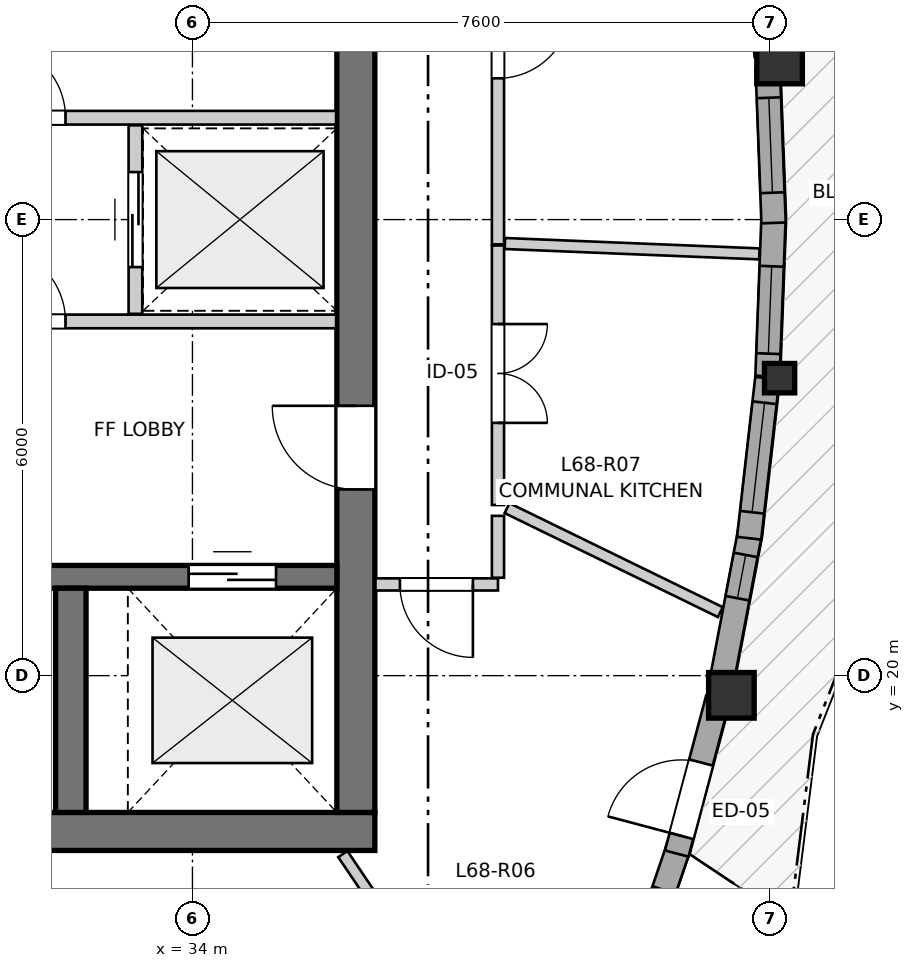
"""IFC4 building model, lengths in metres.
Left out: names, types, materials, properties, quantities, classifications, styles, units other than length and angle.
Written with IfcOpenShell. Run it as: python <this file> out.ifc"""

import sys

from ifc_helpers import new_model, si_unit, direction, frame, frame_2d, origin, origin_2d, place, context, subcontext, project, spatial, rectangle, i_section, extrude, source, transform, mapped, element, fill, save


model = new_model("IFC4")
c1 = context("Model", 3, precision=1e-05, world=origin(), true_north=direction((0.0, 1.0)))
c2 = subcontext(c1, "Body", "Model", "MODEL_VIEW")
j1 = project(units=[si_unit("LENGTHUNIT", "METRE"), si_unit("PLANEANGLEUNIT", "RADIAN")], contexts=[c1])
p1 = place(None, origin())
s1 = spatial("IfcSite", under=j1, at=p1, CompositionType="ELEMENT")
p2 = place(p1, origin())
s2 = spatial("IfcBuilding", under=s1, at=p2, CompositionType="ELEMENT")
p3 = place(p2, frame((0.0, 0.0, 227.6)))
s3 = spatial("IfcBuildingStorey", under=s2, at=p3, CompositionType="ELEMENT", Elevation=227.6)
p4 = place(p3, frame((24.3, 17.95, 0.0), z_axis=(0.0, 0.0, 1.0), x_axis=(1.0, 0.0, 0.0)))
e1 = element("IfcWall", 1, at=p4, inside=s3, PredefinedType="SHEAR", context=c2, shape_type="SweptSolid", body=[
    extrude(rectangle(XDim=12.1, YDim=0.5, at=frame_2d((6.05, 0.0))), origin(), (0.0, 0.0, 1.0), 2.96),
])
p5 = place(p3, frame((36.15, 18.2, 0.0), z_axis=(0.0, 0.0, 1.0), x_axis=(0.0, 1.0, 0.0)))
e2 = element("IfcWall", 2, at=p5, inside=s3, PredefinedType="SHEAR", context=c2, shape_type="SweptSolid", body=[
    extrude(rectangle(XDim=15.6, YDim=0.5, at=frame_2d((7.8, 0.0))), origin(), (0.0, 0.0, 1.0), 2.96),
])
p6 = place(p5, frame((4.25, 0.0, 0.0)))
e3 = element("IfcOpeningElement", 3, at=p6, cuts=e2, PredefinedType="OPENING", context=c2, shape_type="SweptSolid", body=[
    extrude(rectangle(XDim=1.1, YDim=2.15, at=frame_2d((0.55, 1.075))), frame((0.0, 0.26, 0.0), z_axis=(0.0, -1.0, 0.0), x_axis=(1.0, 0.0, 0.0)), (0.0, 0.0, 1.0), 0.52),
])
p7 = place(p5, frame((10.25, 0.0, 0.0)))
e4 = element("IfcOpeningElement", 4, at=p7, cuts=e2, PredefinedType="OPENING", context=c2, shape_type="SweptSolid", body=[
    extrude(rectangle(XDim=1.1, YDim=2.15, at=frame_2d((0.55, 1.075))), frame((0.0, 0.26, 0.0), z_axis=(0.0, -1.0, 0.0), x_axis=(1.0, 0.0, 0.0)), (0.0, 0.0, 1.0), 0.52),
])
p8 = place(p3, frame((24.8, 21.3, 0.0), z_axis=(0.0, 0.0, 1.0), x_axis=(1.0, 0.0, 0.0)))
e5 = element("IfcWall", 5, at=p8, inside=s3, PredefinedType="SHEAR", context=c2, shape_type="SweptSolid", body=[
    extrude(rectangle(XDim=11.1, YDim=0.3, at=frame_2d((5.55, 0.0))), origin(), (0.0, 0.0, 1.0), 2.96),
])
p9 = place(p8, frame((6.22, 0.0, 0.0)))
e6 = element("IfcOpeningElement", 6, at=p9, cuts=e5, PredefinedType="OPENING", context=c2, shape_type="SweptSolid", body=[
    extrude(rectangle(XDim=0.98, YDim=2.15, at=frame_2d((0.49, 1.075))), frame((0.0, 0.16, 0.0), z_axis=(0.0, -1.0, 0.0), x_axis=(1.0, 0.0, 0.0)), (0.0, 0.0, 1.0), 0.32),
])
p10 = place(p8, frame((9.15, 0.0, 0.0)))
e7 = element("IfcOpeningElement", 7, at=p10, cuts=e5, PredefinedType="OPENING", context=c2, shape_type="SweptSolid", body=[
    extrude(rectangle(XDim=1.15, YDim=2.15, at=frame_2d((0.575, 1.075))), frame((0.0, 0.16, 0.0), z_axis=(0.0, -1.0, 0.0), x_axis=(1.0, 0.0, 0.0)), (0.0, 0.0, 1.0), 0.32),
])
p11 = place(p3, frame((32.4, 18.2, 0.0), z_axis=(0.0, 0.0, 1.0), x_axis=(0.0, 1.0, 0.0)))
e8 = element("IfcWall", 8, at=p11, inside=s3, PredefinedType="SHEAR", context=c2, shape_type="SweptSolid", body=[
    extrude(rectangle(XDim=2.95, YDim=0.4, at=frame_2d((1.475, 0.0))), origin(), (0.0, 0.0, 1.0), 2.96),
])
m1 = source(origin(), c2, "Body", "SweptSolid", [
    extrude(rectangle(XDim=0.6, YDim=0.6, at=origin_2d()), origin(), (0.0, 0.0, 1.0), 2.96),
])
p12 = place(p3, frame((41.091, 19.741, 0.0), z_axis=(0.0, 0.0, 1.0), x_axis=(1.0, 0.0, 0.0)))
e9 = element("IfcColumn", 9, at=p12, inside=s3, PredefinedType="COLUMN", context=c2, shape_type="MappedRepresentation", body=[
    mapped(m1, transform((0.0, 0.0, 0.0), x_axis=(1.0, 0.0, 0.0), y_axis=(0.0, 1.0, 0.0), z_axis=(0.0, 0.0, 1.0), scale=1.0)),
])
m2 = source(origin(), c2, "Body", "SweptSolid", [
    extrude(i_section(OverallWidth=0.398, OverallDepth=0.387, WebThickness=0.019, FlangeThickness=0.03, FilletRadius=0.015, at=origin_2d()), origin(), (0.0, 0.0, 1.0), 2.96),
])
p13 = place(p3, frame((41.725, 23.914, 0.0), z_axis=(0.0, 0.0, 1.0), x_axis=(1.0, 0.0, 0.0)))
e10 = element("IfcColumn", 10, at=p13, inside=s3, PredefinedType="PILASTER", context=c2, shape_type="MappedRepresentation", body=[
    mapped(m2, transform((0.0, 0.0, 0.0), x_axis=(1.0, 0.0, 0.0), y_axis=(0.0, 1.0, 0.0), z_axis=(0.0, 0.0, 1.0), scale=1.0)),
])
p14 = place(p3, frame((41.725, 28.086, 0.0), z_axis=(0.0, 0.0, 1.0), x_axis=(1.0, 0.0, 0.0)))
e11 = element("IfcColumn", 11, at=p14, inside=s3, PredefinedType="COLUMN", context=c2, shape_type="MappedRepresentation", body=[
    mapped(m1, transform((0.0, 0.0, 0.0), x_axis=(1.0, 0.0, 0.0), y_axis=(0.0, 1.0, 0.0), z_axis=(0.0, 0.0, 1.0), scale=1.0)),
])
p15 = place(p3, frame((39.677, 15.639, 0.0), z_axis=(0.0, 0.0, 1.0), x_axis=(0.323664392341, 0.946171951143, 0.0)))
e12 = element("IfcWall", 12, at=p15, inside=s3, PredefinedType="SOLIDWALL", context=c2, shape_type="SweptSolid", body=[
    extrude(rectangle(XDim=2.223, YDim=0.32, at=frame_2d((1.111, 0.0))), origin(), (0.0, 0.0, 1.0), 2.58),
])
p16 = place(p15, frame((0.576, 0.0, 0.82)))
e13 = element("IfcOpeningElement", 13, at=p16, cuts=e12, PredefinedType="OPENING", context=c2, shape_type="SweptSolid", body=[
    extrude(rectangle(XDim=1.05, YDim=1.45, at=frame_2d((0.525, 0.725))), frame((0.0, 0.17, 0.0), z_axis=(0.0, -1.0, 0.0), x_axis=(1.0, 0.0, 0.0)), (0.0, 0.0, 1.0), 0.34),
])
p17 = place(p3, frame((40.372, 17.659, 0.0), z_axis=(0.0, 0.0, 1.0), x_axis=(0.2570422776, 0.966400159109, 0.0)))
e14 = element("IfcWall", 14, at=p17, inside=s3, PredefinedType="SOLIDWALL", context=c2, shape_type="SweptSolid", body=[
    extrude(rectangle(XDim=2.107, YDim=0.32, at=frame_2d((1.053, 0.0))), origin(), (0.0, 0.0, 1.0), 2.58),
])
p18 = place(p17, frame((0.24, 0.0, 0.0)))
e15 = element("IfcOpeningElement", 15, at=p18, cuts=e14, PredefinedType="OPENING", context=c2, shape_type="SweptSolid", body=[
    extrude(rectangle(XDim=1.0, YDim=2.1, at=frame_2d((0.5, 1.05))), frame((0.0, 0.17, 0.0), z_axis=(0.0, -1.0, 0.0), x_axis=(1.0, 0.0, 0.0)), (0.0, 0.0, 1.0), 0.34),
])
p19 = place(p3, frame((40.95, 19.86, 0.0), z_axis=(0.0, 0.0, 1.0), x_axis=(0.18667884524, 0.982420993638, 0.0)))
e16 = element("IfcWall", 16, at=p19, inside=s3, PredefinedType="SOLIDWALL", context=c2, shape_type="SweptSolid", body=[
    extrude(rectangle(XDim=2.072, YDim=0.32, at=frame_2d((1.036, 0.0))), origin(), (0.0, 0.0, 1.0), 2.58),
])
p20 = place(p19, frame((1.18, 0.0, 0.82)))
e17 = element("IfcOpeningElement", 17, at=p20, cuts=e16, PredefinedType="OPENING", context=c2, shape_type="SweptSolid", body=[
    extrude(rectangle(XDim=0.58, YDim=1.35, at=frame_2d((0.29, 0.675))), frame((0.0, 0.17, 0.0), z_axis=(0.0, -1.0, 0.0), x_axis=(1.0, 0.0, 0.0)), (0.0, 0.0, 1.0), 0.34),
])
p21 = place(p3, frame((41.324, 21.808, 0.0), z_axis=(0.0, 0.0, 1.0), x_axis=(0.113315758547, 0.993559026362, 0.0)))
e18 = element("IfcWall", 18, at=p21, inside=s3, PredefinedType="SOLIDWALL", context=c2, shape_type="SweptSolid", body=[
    extrude(rectangle(XDim=2.118, YDim=0.32, at=frame_2d((1.059, 0.0))), origin(), (0.0, 0.0, 1.0), 2.58),
])
p22 = place(p21, frame((0.344, 0.0, 0.82)))
e19 = element("IfcOpeningElement", 19, at=p22, cuts=e18, PredefinedType="OPENING", context=c2, shape_type="SweptSolid", body=[
    extrude(rectangle(XDim=1.45, YDim=1.25, at=frame_2d((0.725, 0.625))), frame((0.0, 0.17, 0.0), z_axis=(0.0, -1.0, 0.0), x_axis=(1.0, 0.0, 0.0)), (0.0, 0.0, 1.0), 0.34),
])
p23 = place(p3, frame((41.566, 23.94, 0.0), z_axis=(0.0, 0.0, 1.0), x_axis=(0.037912160544, 0.999281075615, 0.0)))
e20 = element("IfcWall", 20, at=p23, inside=s3, PredefinedType="SOLIDWALL", context=c2, shape_type="SweptSolid", body=[
    extrude(rectangle(XDim=2.106, YDim=0.32, at=frame_2d((1.053, 0.0))), origin(), (0.0, 0.0, 1.0), 2.58),
])
p24 = place(p23, frame((0.297, 0.0, 0.82)))
e21 = element("IfcOpeningElement", 21, at=p24, cuts=e20, PredefinedType="OPENING", context=c2, shape_type="SweptSolid", body=[
    extrude(rectangle(XDim=1.15, YDim=1.2, at=frame_2d((0.575, 0.6))), frame((0.0, 0.17, 0.0), z_axis=(0.0, -1.0, 0.0), x_axis=(1.0, 0.0, 0.0)), (0.0, 0.0, 1.0), 0.34),
])
p25 = place(p3, frame((41.646, 25.956, 0.0), z_axis=(0.0, 0.0, 1.0), x_axis=(-0.038018581285, 0.999277032397, 0.0)))
e22 = element("IfcWall", 22, at=p25, inside=s3, PredefinedType="SOLIDWALL", context=c2, shape_type="SweptSolid", body=[
    extrude(rectangle(XDim=2.036, YDim=0.32, at=frame_2d((1.018, 0.0))), origin(), (0.0, 0.0, 1.0), 2.58),
])
p26 = place(p25, frame((0.398, 0.0, 0.82)))
e23 = element("IfcOpeningElement", 23, at=p26, cuts=e22, PredefinedType="OPENING", context=c2, shape_type="SweptSolid", body=[
    extrude(rectangle(XDim=1.25, YDim=1.35, at=frame_2d((0.625, 0.675))), frame((0.0, 0.17, 0.0), z_axis=(0.0, -1.0, 0.0), x_axis=(1.0, 0.0, 0.0)), (0.0, 0.0, 1.0), 0.34),
])
p27 = place(p3, frame((41.556, 28.158, 0.0), z_axis=(0.0, 0.0, 1.0), x_axis=(-0.113270843693, 0.993564147888, 0.0)))
e24 = element("IfcWall", 24, at=p27, inside=s3, PredefinedType="SOLIDWALL", context=c2, shape_type="SweptSolid", body=[
    extrude(rectangle(XDim=2.048, YDim=0.32, at=frame_2d((1.024, 0.0))), origin(), (0.0, 0.0, 1.0), 2.58),
])
p28 = place(p27, frame((0.544, 0.0, 0.82)))
e25 = element("IfcOpeningElement", 25, at=p28, cuts=e24, PredefinedType="OPENING", context=c2, shape_type="SweptSolid", body=[
    extrude(rectangle(XDim=0.95, YDim=1.35, at=frame_2d((0.475, 0.675))), frame((0.0, 0.17, 0.0), z_axis=(0.0, -1.0, 0.0), x_axis=(1.0, 0.0, 0.0)), (0.0, 0.0, 1.0), 0.34),
])
p29 = place(p3, frame((30.67, 24.66, 0.0), z_axis=(0.0, 0.0, 1.0), x_axis=(1.0, 0.0, 0.0)))
e26 = element("IfcWall", 26, at=p29, inside=s3, PredefinedType="PARTITIONING", context=c2, shape_type="SweptSolid", body=[
    extrude(rectangle(XDim=5.22, YDim=0.18, at=frame_2d((2.61, 0.0))), origin(), (0.0, 0.0, 1.0), 2.96),
])
p30 = place(p29, frame((0.68, 0.0, 0.0)))
e27 = element("IfcOpeningElement", 27, at=p30, cuts=e26, PredefinedType="OPENING", context=c2, shape_type="SweptSolid", body=[
    extrude(rectangle(XDim=0.98, YDim=2.15, at=frame_2d((0.49, 1.075))), frame((0.0, 0.1, 0.0), z_axis=(0.0, -1.0, 0.0), x_axis=(1.0, 0.0, 0.0)), (0.0, 0.0, 1.0), 0.2),
])
p31 = place(p3, frame((30.67, 27.34, 0.0), z_axis=(0.0, 0.0, 1.0), x_axis=(1.0, 0.0, 0.0)))
e28 = element("IfcWall", 28, at=p31, inside=s3, PredefinedType="PARTITIONING", context=c2, shape_type="SweptSolid", body=[
    extrude(rectangle(XDim=5.22, YDim=0.18, at=frame_2d((2.61, 0.0))), origin(), (0.0, 0.0, 1.0), 2.96),
])
p32 = place(p31, frame((0.68, 0.0, 0.0)))
e29 = element("IfcOpeningElement", 29, at=p32, cuts=e28, PredefinedType="OPENING", context=c2, shape_type="SweptSolid", body=[
    extrude(rectangle(XDim=0.98, YDim=2.15, at=frame_2d((0.49, 1.075))), frame((0.0, 0.1, 0.0), z_axis=(0.0, -1.0, 0.0), x_axis=(1.0, 0.0, 0.0)), (0.0, 0.0, 1.0), 0.2),
])
p33 = place(p3, frame((33.25, 24.76, 0.0), z_axis=(0.0, 0.0, 1.0), x_axis=(0.0, 1.0, 0.0)))
e30 = element("IfcWall", 30, at=p33, inside=s3, PredefinedType="PARTITIONING", context=c2, shape_type="SweptSolid", body=[
    extrude(rectangle(XDim=2.48, YDim=0.18, at=frame_2d((1.24, 0.0))), origin(), (0.0, 0.0, 1.0), 2.96),
])
p34 = place(p33, frame((0.615, 0.0, 0.0)))
e31 = element("IfcOpeningElement", 31, at=p34, cuts=e30, PredefinedType="OPENING", context=c2, shape_type="SweptSolid", body=[
    extrude(rectangle(XDim=1.25, YDim=2.15, at=frame_2d((0.625, 1.075))), frame((0.0, 0.1, 0.0), z_axis=(0.0, -1.0, 0.0), x_axis=(1.0, 0.0, 0.0)), (0.0, 0.0, 1.0), 0.2),
])
p35 = place(p3, frame((38.02, 31.006, 0.0), z_axis=(0.0, 0.0, 1.0), x_axis=(0.0, -1.0, 0.0)))
e32 = element("IfcWall", 32, at=p35, inside=s3, PredefinedType="PARTITIONING", context=c2, shape_type="SweptSolid", body=[
    extrude(rectangle(XDim=5.332, YDim=0.16, at=frame_2d((2.666, 0.0))), origin(), (0.0, 0.0, 1.0), 2.628),
])
p36 = place(p35, frame((2.188, 0.0, 0.0)))
e33 = element("IfcOpeningElement", 33, at=p36, cuts=e32, PredefinedType="OPENING", context=c2, shape_type="SweptSolid", body=[
    extrude(rectangle(XDim=0.96, YDim=2.1, at=frame_2d((0.48, 1.05))), frame((0.0, 0.09, 0.0), z_axis=(0.0, -1.0, 0.0), x_axis=(1.0, 0.0, 0.0)), (0.0, 0.0, 1.0), 0.18),
])
p37 = place(p3, frame((38.02, 25.659, 0.0), z_axis=(0.0, 0.0, 1.0), x_axis=(0.0, -1.0, 0.0)))
e34 = element("IfcWall", 34, at=p37, inside=s3, PredefinedType="PARTITIONING", context=c2, shape_type="SweptSolid", body=[
    extrude(rectangle(XDim=3.414, YDim=0.16, at=frame_2d((1.707, 0.0))), origin(), (0.0, 0.0, 1.0), 2.628),
])
p38 = place(p37, frame((1.033, 0.0, 0.0)))
e35 = element("IfcOpeningElement", 35, at=p38, cuts=e34, PredefinedType="OPENING", context=c2, shape_type="SweptSolid", body=[
    extrude(rectangle(XDim=1.3, YDim=2.1, at=frame_2d((0.65, 1.05))), frame((0.0, 0.09, 0.0), z_axis=(0.0, -1.0, 0.0), x_axis=(1.0, 0.0, 0.0)), (0.0, 0.0, 1.0), 0.18),
])
p39 = place(p3, frame((38.02, 21.2, 0.0), z_axis=(0.0, 0.0, 1.0), x_axis=(-1.0, 0.0, 0.0)))
e36 = element("IfcWall", 36, at=p39, inside=s3, PredefinedType="PARTITIONING", context=c2, shape_type="SweptSolid", body=[
    extrude(rectangle(XDim=1.612, YDim=0.16, at=frame_2d((0.806, 0.0))), origin(), (0.0, 0.0, 1.0), 2.96),
])
p40 = place(p39, frame((0.33, 0.0, 0.0)))
e37 = element("IfcOpeningElement", 37, at=p40, cuts=e36, PredefinedType="OPENING", context=c2, shape_type="SweptSolid", body=[
    extrude(rectangle(XDim=0.96, YDim=2.1, at=frame_2d((0.48, 1.05))), frame((0.0, 0.09, 0.0), z_axis=(0.0, -1.0, 0.0), x_axis=(1.0, 0.0, 0.0)), (0.0, 0.0, 1.0), 0.18),
])
p41 = place(p3, frame((35.979, 17.653, 0.0), z_axis=(0.0, 0.0, 1.0), x_axis=(0.559125350393, -0.829083133677, 0.0)))
e38 = element("IfcWall", 38, at=p41, inside=s3, PredefinedType="PARTITIONING", context=c2, shape_type="SweptSolid", body=[
    extrude(rectangle(XDim=5.262, YDim=0.145, at=frame_2d((2.631, 0.0))), origin(), (0.0, 0.0, 1.0), 2.96),
])
p42 = place(p3, frame((38.111, 25.685, 0.0), z_axis=(0.0, 0.0, 1.0), x_axis=(0.999167325882, -0.040800182477, 0.0)))
e39 = element("IfcWall", 39, at=p42, inside=s3, PredefinedType="PARTITIONING", context=c2, shape_type="SweptSolid", body=[
    extrude(rectangle(XDim=3.351, YDim=0.145, at=frame_2d((1.675, 0.0))), origin(), (0.0, 0.0, 1.0), 2.96),
])
p43 = place(p3, frame((38.139, 22.204, 0.0), z_axis=(0.0, 0.0, 1.0), x_axis=(0.898869860356, -0.43821567081, 0.0)))
e40 = element("IfcWall", 40, at=p43, inside=s3, PredefinedType="PARTITIONING", context=c2, shape_type="SweptSolid", body=[
    extrude(rectangle(XDim=3.123, YDim=0.145, at=frame_2d((1.562, 0.0))), origin(), (0.0, 0.0, 1.0), 2.96),
])
p44 = place(p3, frame((38.02, 21.288, 0.0), z_axis=(0.0, 0.0, 1.0), x_axis=(0.0, 1.0, 0.0)))
e41 = element("IfcWall", 41, at=p44, inside=s3, PredefinedType="PARTITIONING", context=c2, shape_type="SweptSolid", body=[
    extrude(rectangle(XDim=0.814, YDim=0.16, at=frame_2d((0.407, 0.0))), origin(), (0.0, 0.0, 1.0), 2.628),
])
m3 = source(origin(), c2, "Body", "SweptSolid", [
    extrude(rectangle(XDim=0.58, YDim=1.35, at=frame_2d((0.29, 0.675))), frame((0.0, 0.03, 0.0), z_axis=(0.0, -1.0, 0.0), x_axis=(1.0, 0.0, 0.0)), (0.0, 0.0, 1.0), 0.06),
])
p45 = place(p20, origin())
e42 = element("IfcWindow", 42, at=p45, inside=s3, PartitioningType="SINGLE_PANEL", PredefinedType="WINDOW", context=c2, shape_type="MappedRepresentation", body=[
    mapped(m3, transform((0.0, 0.0, 0.0), x_axis=(1.0, 0.0, 0.0), y_axis=(0.0, 1.0, 0.0), z_axis=(0.0, 0.0, 1.0), scale=1.0)),
])
fill(e17, e42)
m4 = source(origin(), c2, "Body", "SweptSolid", [
    extrude(rectangle(XDim=1.45, YDim=1.25, at=frame_2d((0.725, 0.625))), frame((0.0, 0.03, 0.0), z_axis=(0.0, -1.0, 0.0), x_axis=(1.0, 0.0, 0.0)), (0.0, 0.0, 1.0), 0.06),
])
p46 = place(p22, origin())
e43 = element("IfcWindow", 43, at=p46, inside=s3, PartitioningType="SINGLE_PANEL", PredefinedType="WINDOW", context=c2, shape_type="MappedRepresentation", body=[
    mapped(m4, transform((0.0, 0.0, 0.0), x_axis=(1.0, 0.0, 0.0), y_axis=(0.0, 1.0, 0.0), z_axis=(0.0, 0.0, 1.0), scale=1.0)),
])
fill(e19, e43)
m5 = source(origin(), c2, "Body", "SweptSolid", [
    extrude(rectangle(XDim=1.15, YDim=1.2, at=frame_2d((0.575, 0.6))), frame((0.0, 0.03, 0.0), z_axis=(0.0, -1.0, 0.0), x_axis=(1.0, 0.0, 0.0)), (0.0, 0.0, 1.0), 0.06),
])
p47 = place(p24, origin())
e44 = element("IfcWindow", 44, at=p47, inside=s3, PartitioningType="SINGLE_PANEL", PredefinedType="WINDOW", context=c2, shape_type="MappedRepresentation", body=[
    mapped(m5, transform((0.0, 0.0, 0.0), x_axis=(1.0, 0.0, 0.0), y_axis=(0.0, 1.0, 0.0), z_axis=(0.0, 0.0, 1.0), scale=1.0)),
])
fill(e21, e44)
m6 = source(origin(), c2, "Body", "SweptSolid", [
    extrude(rectangle(XDim=1.25, YDim=1.35, at=frame_2d((0.625, 0.675))), frame((0.0, 0.03, 0.0), z_axis=(0.0, -1.0, 0.0), x_axis=(1.0, 0.0, 0.0)), (0.0, 0.0, 1.0), 0.06),
])
p48 = place(p26, origin())
e45 = element("IfcWindow", 45, at=p48, inside=s3, PartitioningType="SINGLE_PANEL", PredefinedType="WINDOW", context=c2, shape_type="MappedRepresentation", body=[
    mapped(m6, transform((0.0, 0.0, 0.0), x_axis=(1.0, 0.0, 0.0), y_axis=(0.0, 1.0, 0.0), z_axis=(0.0, 0.0, 1.0), scale=1.0)),
])
fill(e23, e45)
m7 = source(origin(), c2, "Body", "SweptSolid", [
    extrude(rectangle(XDim=1.0, YDim=2.1, at=frame_2d((0.5, 1.05))), frame((0.0, 0.025, 0.0), z_axis=(0.0, -1.0, 0.0), x_axis=(1.0, 0.0, 0.0)), (0.0, 0.0, 1.0), 0.05),
])
p49 = place(p18, origin())
e46 = element("IfcDoor", 46, at=p49, inside=s3, OperationType="SINGLE_SWING_LEFT", PredefinedType="DOOR", context=c2, shape_type="MappedRepresentation", body=[
    mapped(m7, transform((0.0, 0.0, 0.0), x_axis=(1.0, 0.0, 0.0), y_axis=(0.0, 1.0, 0.0), z_axis=(0.0, 0.0, 1.0), scale=1.0)),
])
fill(e15, e46)
m8 = source(origin(), c2, "Body", "SweptSolid", [
    extrude(rectangle(XDim=1.15, YDim=2.15, at=frame_2d((0.575, 1.075))), frame((0.0, 0.025, 0.0), z_axis=(0.0, -1.0, 0.0), x_axis=(1.0, 0.0, 0.0)), (0.0, 0.0, 1.0), 0.05),
])
p50 = place(p10, origin())
e47 = element("IfcDoor", 47, at=p50, inside=s3, OperationType="DOUBLE_DOOR_SLIDING", PredefinedType="DOOR", context=c2, shape_type="MappedRepresentation", body=[
    mapped(m8, transform((0.0, 0.0, 0.0), x_axis=(1.0, 0.0, 0.0), y_axis=(0.0, 1.0, 0.0), z_axis=(0.0, 0.0, 1.0), scale=1.0)),
])
fill(e7, e47)
m9 = source(origin(), c2, "Body", "SweptSolid", [
    extrude(rectangle(XDim=1.1, YDim=2.15, at=frame_2d((0.55, 1.075))), frame((0.0, 0.025, 0.0), z_axis=(0.0, -1.0, 0.0), x_axis=(1.0, 0.0, 0.0)), (0.0, 0.0, 1.0), 0.05),
])
p51 = place(p6, origin())
e48 = element("IfcDoor", 48, at=p51, inside=s3, OperationType="SINGLE_SWING_RIGHT", PredefinedType="DOOR", context=c2, shape_type="MappedRepresentation", body=[
    mapped(m9, transform((0.0, 0.0, 0.0), x_axis=(1.0, 0.0, 0.0), y_axis=(0.0, 1.0, 0.0), z_axis=(0.0, 0.0, 1.0), scale=1.0)),
])
fill(e3, e48)
m10 = source(origin(), c2, "Body", "SweptSolid", [
    extrude(rectangle(XDim=0.98, YDim=2.15, at=frame_2d((0.49, 1.075))), frame((0.0, 0.025, 0.0), z_axis=(0.0, -1.0, 0.0), x_axis=(1.0, 0.0, 0.0)), (0.0, 0.0, 1.0), 0.05),
])
p52 = place(p30, origin())
e49 = element("IfcDoor", 49, at=p52, inside=s3, OperationType="SINGLE_SWING_LEFT", PredefinedType="DOOR", context=c2, shape_type="MappedRepresentation", body=[
    mapped(m10, transform((0.0, 0.0, 0.0), x_axis=(1.0, 0.0, 0.0), y_axis=(0.0, 1.0, 0.0), z_axis=(0.0, 0.0, 1.0), scale=1.0)),
])
fill(e27, e49)
p53 = place(p32, origin())
e50 = element("IfcDoor", 50, at=p53, inside=s3, OperationType="SINGLE_SWING_LEFT", PredefinedType="DOOR", context=c2, shape_type="MappedRepresentation", body=[
    mapped(m10, transform((0.0, 0.0, 0.0), x_axis=(1.0, 0.0, 0.0), y_axis=(0.0, 1.0, 0.0), z_axis=(0.0, 0.0, 1.0), scale=1.0)),
])
fill(e29, e50)
m11 = source(origin(), c2, "Body", "SweptSolid", [
    extrude(rectangle(XDim=1.25, YDim=2.15, at=frame_2d((0.625, 1.075))), frame((0.0, 0.025, 0.0), z_axis=(0.0, -1.0, 0.0), x_axis=(1.0, 0.0, 0.0)), (0.0, 0.0, 1.0), 0.05),
])
p54 = place(p34, origin())
e51 = element("IfcDoor", 51, at=p54, inside=s3, OperationType="DOUBLE_DOOR_SLIDING", PredefinedType="DOOR", context=c2, shape_type="MappedRepresentation", body=[
    mapped(m11, transform((0.0, 0.0, 0.0), x_axis=(1.0, 0.0, 0.0), y_axis=(0.0, 1.0, 0.0), z_axis=(0.0, 0.0, 1.0), scale=1.0)),
])
fill(e31, e51)
m12 = source(origin(), c2, "Body", "SweptSolid", [
    extrude(rectangle(XDim=0.96, YDim=2.1, at=frame_2d((0.48, 1.05))), frame((0.0, 0.025, 0.0), z_axis=(0.0, -1.0, 0.0), x_axis=(1.0, 0.0, 0.0)), (0.0, 0.0, 1.0), 0.05),
])
p55 = place(p36, origin())
e52 = element("IfcDoor", 52, at=p55, inside=s3, OperationType="SINGLE_SWING_LEFT", PredefinedType="DOOR", context=c2, shape_type="MappedRepresentation", body=[
    mapped(m12, transform((0.0, 0.0, 0.0), x_axis=(1.0, 0.0, 0.0), y_axis=(0.0, 1.0, 0.0), z_axis=(0.0, 0.0, 1.0), scale=1.0)),
])
fill(e33, e52)
m13 = source(origin(), c2, "Body", "SweptSolid", [
    extrude(rectangle(XDim=1.3, YDim=2.1, at=frame_2d((0.65, 1.05))), frame((0.0, 0.025, 0.0), z_axis=(0.0, -1.0, 0.0), x_axis=(1.0, 0.0, 0.0)), (0.0, 0.0, 1.0), 0.05),
])
p56 = place(p38, origin())
e53 = element("IfcDoor", 53, at=p56, inside=s3, OperationType="DOUBLE_DOOR_SINGLE_SWING", PredefinedType="DOOR", context=c2, shape_type="MappedRepresentation", body=[
    mapped(m13, transform((0.0, 0.0, 0.0), x_axis=(1.0, 0.0, 0.0), y_axis=(0.0, 1.0, 0.0), z_axis=(0.0, 0.0, 1.0), scale=1.0)),
])
fill(e35, e53)
p57 = place(p40, origin())
e54 = element("IfcDoor", 54, at=p57, inside=s3, OperationType="SINGLE_SWING_LEFT", PredefinedType="DOOR", context=c2, shape_type="MappedRepresentation", body=[
    mapped(m12, transform((0.0, 0.0, 0.0), x_axis=(1.0, 0.0, 0.0), y_axis=(0.0, 1.0, 0.0), z_axis=(0.0, 0.0, 1.0), scale=1.0)),
])
fill(e37, e54)
save(model, sys.argv[1])
